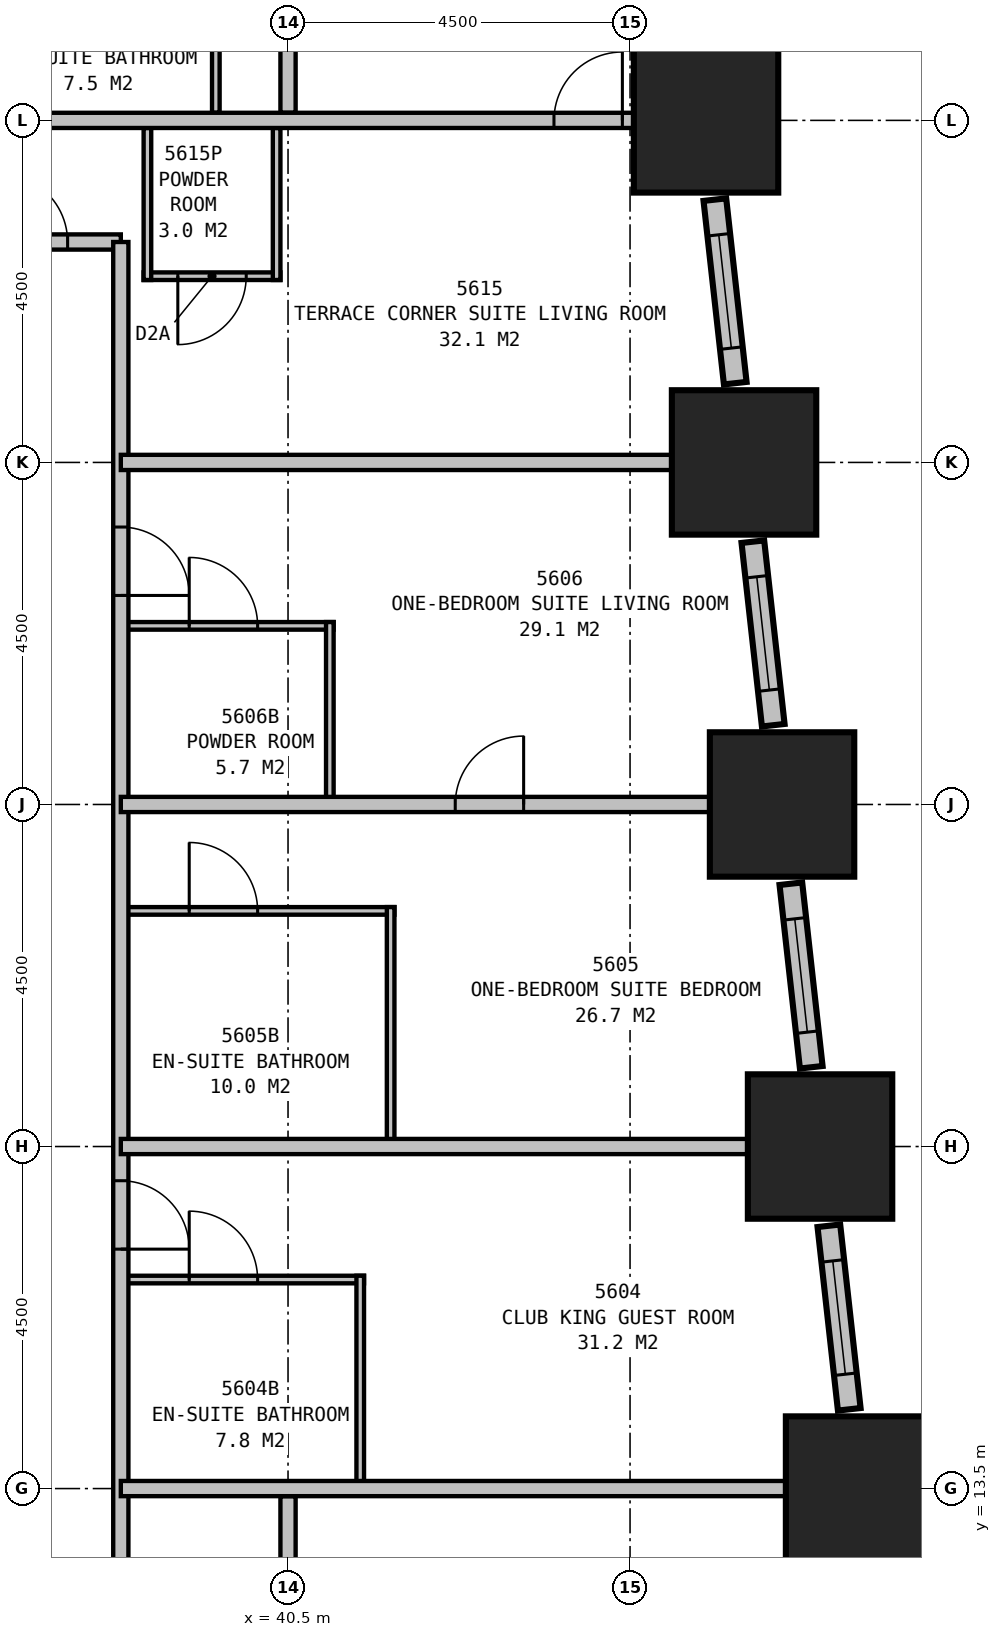
"""IFC4 building model, lengths in metres.
Left out: names, types, materials, properties, quantities, classifications, styles, units other than length and angle.
Written with IfcOpenShell. Run it as: python <this file> out.ifc"""

import sys

from ifc_helpers import new_model, si_unit, direction, frame, frame_2d, origin, origin_2d, place, context, subcontext, project, spatial, rectangle, extrude, element, fill, save


model = new_model("IFC4")
c1 = context("Model", 3, precision=1e-05, world=origin(), true_north=direction((0.0, 1.0)))
c2 = subcontext(c1, "Body", "Model", "MODEL_VIEW")
j1 = project(units=[si_unit("LENGTHUNIT", "METRE"), si_unit("PLANEANGLEUNIT", "RADIAN")], contexts=[c1])
p1 = place(None, origin())
s1 = spatial("IfcSite", under=j1, at=p1, CompositionType="ELEMENT")
p2 = place(p1, origin())
s2 = spatial("IfcBuilding", under=s1, at=p2, CompositionType="ELEMENT")
p3 = place(p2, frame((0.0, 0.0, 217.4)))
s3 = spatial("IfcBuildingStorey", under=s2, at=p3, CompositionType="ELEMENT", Elevation=217.4)
for number, where, z_axis, x_axis in (
    (1, (48.0, 13.5, 0.0), (0.0, 0.0, 1.0), (1.0, 0.0, 0.0)),
    (2, (47.5, 18.0, 0.0), (0.0, 0.0, 1.0), (1.0, 0.0, 0.0)),
    (3, (47.0, 22.5, 0.0), (0.0, 0.0, 1.0), (1.0, 0.0, 0.0)),
    (4, (46.5, 27.0, 0.0), (0.0, 0.0, 1.0), (1.0, 0.0, 0.0)),
    (5, (46.0, 31.5, 0.0), (0.0, 0.0, 1.0), (1.0, 0.0, 0.0)),
):
    element("IfcColumn", number, at=place(p3, frame(where, z_axis=z_axis, x_axis=x_axis)), inside=s3, PredefinedType="COLUMN", context=c2, shape_type="SweptSolid", body=[
        extrude(rectangle(XDim=1.9, YDim=1.9, at=origin_2d()), origin(), (0.0, 0.0, 1.0), 3.9),
    ])
p4 = place(p3, frame((47.884, 14.543, 0.0), z_axis=(0.0, 0.0, 1.0), x_axis=(-0.110343286306, 0.993893535127, 0.0)))
e6 = element("IfcWall", 6, at=p4, inside=s3, PredefinedType="STANDARD", context=c2, shape_type="SweptSolid", body=[
    extrude(rectangle(XDim=2.429, YDim=0.3, at=frame_2d((1.215, 0.0))), origin(), (0.0, 0.0, 1.0), 2.15),
])
p5 = place(p4, frame((0.465, 0.0, 0.5)))
e7 = element("IfcOpeningElement", 7, at=p5, cuts=e6, PredefinedType="OPENING", context=c2, shape_type="SweptSolid", body=[
    extrude(rectangle(XDim=1.5, YDim=1.5, at=frame_2d((0.75, 0.75))), frame((0.0, 0.16, 0.0), z_axis=(0.0, -1.0, 0.0), x_axis=(1.0, 0.0, 0.0)), (0.0, 0.0, 1.0), 0.32),
])
p6 = place(p3, frame((47.384, 19.043, 0.0), z_axis=(0.0, 0.0, 1.0), x_axis=(-0.110343286306, 0.993893535127, 0.0)))
e8 = element("IfcWall", 8, at=p6, inside=s3, PredefinedType="STANDARD", context=c2, shape_type="SweptSolid", body=[
    extrude(rectangle(XDim=2.429, YDim=0.3, at=frame_2d((1.215, 0.0))), origin(), (0.0, 0.0, 1.0), 2.15),
])
p7 = place(p6, frame((0.465, 0.0, 0.5)))
e9 = element("IfcOpeningElement", 9, at=p7, cuts=e8, PredefinedType="OPENING", context=c2, shape_type="SweptSolid", body=[
    extrude(rectangle(XDim=1.5, YDim=1.5, at=frame_2d((0.75, 0.75))), frame((0.0, 0.16, 0.0), z_axis=(0.0, -1.0, 0.0), x_axis=(1.0, 0.0, 0.0)), (0.0, 0.0, 1.0), 0.32),
])
p8 = place(p3, frame((46.884, 23.543, 0.0), z_axis=(0.0, 0.0, 1.0), x_axis=(-0.110343286306, 0.993893535127, 0.0)))
e10 = element("IfcWall", 10, at=p8, inside=s3, PredefinedType="STANDARD", context=c2, shape_type="SweptSolid", body=[
    extrude(rectangle(XDim=2.429, YDim=0.3, at=frame_2d((1.215, 0.0))), origin(), (0.0, 0.0, 1.0), 2.15),
])
p9 = place(p8, frame((0.465, 0.0, 0.5)))
e11 = element("IfcOpeningElement", 11, at=p9, cuts=e10, PredefinedType="OPENING", context=c2, shape_type="SweptSolid", body=[
    extrude(rectangle(XDim=1.5, YDim=1.5, at=frame_2d((0.75, 0.75))), frame((0.0, 0.16, 0.0), z_axis=(0.0, -1.0, 0.0), x_axis=(1.0, 0.0, 0.0)), (0.0, 0.0, 1.0), 0.32),
])
p10 = place(p3, frame((46.384, 28.043, 0.0), z_axis=(0.0, 0.0, 1.0), x_axis=(-0.110343286306, 0.993893535127, 0.0)))
e12 = element("IfcWall", 12, at=p10, inside=s3, PredefinedType="STANDARD", context=c2, shape_type="SweptSolid", body=[
    extrude(rectangle(XDim=2.429, YDim=0.3, at=frame_2d((1.215, 0.0))), origin(), (0.0, 0.0, 1.0), 2.15),
])
p11 = place(p10, frame((0.464, 0.0, 0.5)))
e13 = element("IfcOpeningElement", 13, at=p11, cuts=e12, PredefinedType="OPENING", context=c2, shape_type="SweptSolid", body=[
    extrude(rectangle(XDim=1.5, YDim=1.5, at=frame_2d((0.75, 0.75))), frame((0.0, 0.16, 0.0), z_axis=(0.0, -1.0, 0.0), x_axis=(1.0, 0.0, 0.0)), (0.0, 0.0, 1.0), 0.32),
])
p12 = place(p3, frame((12.473, 29.9, 0.0), z_axis=(0.0, 0.0, 1.0), x_axis=(1.0, 0.0, 0.0)))
e14 = element("IfcWall", 14, at=p12, inside=s3, PredefinedType="PARTITIONING", context=c2, shape_type="SweptSolid", body=[
    extrude(rectangle(XDim=25.827, YDim=0.2, at=frame_2d((12.914, 0.0))), origin(), (0.0, 0.0, 1.0), 3.65),
])
p13 = place(p12, frame((1.25, 0.0, 0.0)))
e15 = element("IfcOpeningElement", 15, at=p13, cuts=e14, PredefinedType="OPENING", context=c2, shape_type="SweptSolid", body=[
    extrude(rectangle(XDim=0.9, YDim=2.1, at=frame_2d((0.45, 1.05))), frame((0.0, 0.11, 0.0), z_axis=(0.0, -1.0, 0.0), x_axis=(1.0, 0.0, 0.0)), (0.0, 0.0, 1.0), 0.22),
])
p14 = place(p12, frame((8.677, 0.0, 0.0)))
e16 = element("IfcOpeningElement", 16, at=p14, cuts=e14, PredefinedType="OPENING", context=c2, shape_type="SweptSolid", body=[
    extrude(rectangle(XDim=0.9, YDim=2.1, at=frame_2d((0.45, 1.05))), frame((0.0, 0.11, 0.0), z_axis=(0.0, -1.0, 0.0), x_axis=(1.0, 0.0, 0.0)), (0.0, 0.0, 1.0), 0.22),
])
p15 = place(p12, frame((12.777, 0.0, 0.0)))
e17 = element("IfcOpeningElement", 17, at=p15, cuts=e14, PredefinedType="OPENING", context=c2, shape_type="SweptSolid", body=[
    extrude(rectangle(XDim=0.9, YDim=2.1, at=frame_2d((0.45, 1.05))), frame((0.0, 0.11, 0.0), z_axis=(0.0, -1.0, 0.0), x_axis=(1.0, 0.0, 0.0)), (0.0, 0.0, 1.0), 0.22),
])
p16 = place(p12, frame((22.177, 0.0, 0.0)))
e18 = element("IfcOpeningElement", 18, at=p16, cuts=e14, PredefinedType="OPENING", context=c2, shape_type="SweptSolid", body=[
    extrude(rectangle(XDim=0.9, YDim=2.1, at=frame_2d((0.45, 1.05))), frame((0.0, 0.11, 0.0), z_axis=(0.0, -1.0, 0.0), x_axis=(1.0, 0.0, 0.0)), (0.0, 0.0, 1.0), 0.22),
])
p17 = place(p12, frame((24.227, 0.0, 0.0)))
e19 = element("IfcOpeningElement", 19, at=p17, cuts=e14, PredefinedType="OPENING", context=c2, shape_type="SweptSolid", body=[
    extrude(rectangle(XDim=0.9, YDim=2.1, at=frame_2d((0.45, 1.05))), frame((0.0, 0.11, 0.0), z_axis=(0.0, -1.0, 0.0), x_axis=(1.0, 0.0, 0.0)), (0.0, 0.0, 1.0), 0.22),
])
p18 = place(p3, frame((38.3, 11.2, 0.0), z_axis=(0.0, 0.0, 1.0), x_axis=(0.0, 1.0, 0.0)))
e20 = element("IfcWall", 20, at=p18, inside=s3, PredefinedType="PARTITIONING", context=c2, shape_type="SweptSolid", body=[
    extrude(rectangle(XDim=18.7, YDim=0.2, at=frame_2d((9.35, 0.0))), origin(), (0.0, 0.0, 1.0), 3.65),
])
p19 = place(p18, frame((6.35, 0.0, 0.0), z_axis=(0.0, 0.0, 1.0), x_axis=(-1.0, 0.0, 0.0)))
e21 = element("IfcOpeningElement", 21, at=p19, cuts=e20, PredefinedType="OPENING", context=c2, shape_type="SweptSolid", body=[
    extrude(rectangle(XDim=0.9, YDim=2.1, at=frame_2d((0.45, 1.05))), frame((0.0, 0.11, 0.0), z_axis=(0.0, -1.0, 0.0), x_axis=(1.0, 0.0, 0.0)), (0.0, 0.0, 1.0), 0.22),
])
p20 = place(p18, frame((14.95, 0.0, 0.0), z_axis=(0.0, 0.0, 1.0), x_axis=(-1.0, 0.0, 0.0)))
e22 = element("IfcOpeningElement", 22, at=p20, cuts=e20, PredefinedType="OPENING", context=c2, shape_type="SweptSolid", body=[
    extrude(rectangle(XDim=0.9, YDim=2.1, at=frame_2d((0.45, 1.05))), frame((0.0, 0.11, 0.0), z_axis=(0.0, -1.0, 0.0), x_axis=(1.0, 0.0, 0.0)), (0.0, 0.0, 1.0), 0.22),
])
p21 = place(p3, frame((38.3, 18.0, 0.0), z_axis=(0.0, 0.0, 1.0), x_axis=(1.0, 0.0, 0.0)))
e23 = element("IfcWall", 23, at=p21, inside=s3, PredefinedType="PARTITIONING", context=c2, shape_type="SweptSolid", body=[
    extrude(rectangle(XDim=9.199, YDim=0.2, at=frame_2d((4.6, 0.0))), origin(), (0.0, 0.0, 1.0), 2.65),
])
p22 = place(p3, frame((38.3, 22.5, 0.0), z_axis=(0.0, 0.0, 1.0), x_axis=(1.0, 0.0, 0.0)))
e24 = element("IfcWall", 24, at=p22, inside=s3, PredefinedType="PARTITIONING", context=c2, shape_type="SweptSolid", body=[
    extrude(rectangle(XDim=8.699, YDim=0.2, at=frame_2d((4.35, 0.0))), origin(), (0.0, 0.0, 1.0), 2.65),
])
p23 = place(p22, frame((4.4, 0.0, 0.0)))
e25 = element("IfcOpeningElement", 25, at=p23, cuts=e24, PredefinedType="OPENING", context=c2, shape_type="SweptSolid", body=[
    extrude(rectangle(XDim=0.9, YDim=2.1, at=frame_2d((0.45, 1.05))), frame((0.0, 0.11, 0.0), z_axis=(0.0, -1.0, 0.0), x_axis=(1.0, 0.0, 0.0)), (0.0, 0.0, 1.0), 0.22),
])
p24 = place(p3, frame((41.45, 13.5, 0.0), z_axis=(0.0, 0.0, 1.0), x_axis=(0.0, 1.0, 0.0)))
e26 = element("IfcWall", 26, at=p24, inside=s3, PredefinedType="PLUMBINGWALL", context=c2, shape_type="SweptSolid", body=[
    extrude(rectangle(XDim=2.8, YDim=0.1, at=frame_2d((1.4, 0.0))), origin(), (0.0, 0.0, 1.0), 3.65),
])
p25 = place(p3, frame((38.3, 16.25, 0.0), z_axis=(0.0, 0.0, 1.0), x_axis=(1.0, 0.0, 0.0)))
e27 = element("IfcWall", 27, at=p25, inside=s3, PredefinedType="PLUMBINGWALL", context=c2, shape_type="SweptSolid", body=[
    extrude(rectangle(XDim=3.2, YDim=0.1, at=frame_2d((1.6, 0.0))), origin(), (0.0, 0.0, 1.0), 3.65),
])
p26 = place(p25, frame((0.9, 0.0, 0.0)))
e28 = element("IfcOpeningElement", 28, at=p26, cuts=e27, PredefinedType="OPENING", context=c2, shape_type="SweptSolid", body=[
    extrude(rectangle(XDim=0.9, YDim=2.1, at=frame_2d((0.45, 1.05))), frame((0.0, 0.06, 0.0), z_axis=(0.0, -1.0, 0.0), x_axis=(1.0, 0.0, 0.0)), (0.0, 0.0, 1.0), 0.12),
])
p27 = place(p3, frame((41.85, 18.0, 0.0), z_axis=(0.0, 0.0, 1.0), x_axis=(0.0, 1.0, 0.0)))
e29 = element("IfcWall", 29, at=p27, inside=s3, PredefinedType="PLUMBINGWALL", context=c2, shape_type="SweptSolid", body=[
    extrude(rectangle(XDim=3.15, YDim=0.1, at=frame_2d((1.575, 0.0))), origin(), (0.0, 0.0, 1.0), 3.65),
])
p28 = place(p3, frame((38.3, 21.1, 0.0), z_axis=(0.0, 0.0, 1.0), x_axis=(1.0, 0.0, 0.0)))
e30 = element("IfcWall", 30, at=p28, inside=s3, PredefinedType="PLUMBINGWALL", context=c2, shape_type="SweptSolid", body=[
    extrude(rectangle(XDim=3.6, YDim=0.1, at=frame_2d((1.8, 0.0))), origin(), (0.0, 0.0, 1.0), 3.65),
])
p29 = place(p28, frame((0.9, 0.0, 0.0)))
e31 = element("IfcOpeningElement", 31, at=p29, cuts=e30, PredefinedType="OPENING", context=c2, shape_type="SweptSolid", body=[
    extrude(rectangle(XDim=0.9, YDim=2.1, at=frame_2d((0.45, 1.05))), frame((0.0, 0.06, 0.0), z_axis=(0.0, -1.0, 0.0), x_axis=(1.0, 0.0, 0.0)), (0.0, 0.0, 1.0), 0.12),
])
p30 = place(p3, frame((41.05, 22.5, 0.0), z_axis=(0.0, 0.0, 1.0), x_axis=(0.0, 1.0, 0.0)))
e32 = element("IfcWall", 32, at=p30, inside=s3, PredefinedType="PLUMBINGWALL", context=c2, shape_type="SweptSolid", body=[
    extrude(rectangle(XDim=2.4, YDim=0.1, at=frame_2d((1.2, 0.0))), origin(), (0.0, 0.0, 1.0), 3.65),
])
p31 = place(p3, frame((38.3, 24.85, 0.0), z_axis=(0.0, 0.0, 1.0), x_axis=(1.0, 0.0, 0.0)))
e33 = element("IfcWall", 33, at=p31, inside=s3, PredefinedType="PLUMBINGWALL", context=c2, shape_type="SweptSolid", body=[
    extrude(rectangle(XDim=2.8, YDim=0.1, at=frame_2d((1.4, 0.0))), origin(), (0.0, 0.0, 1.0), 3.65),
])
p32 = place(p31, frame((0.9, 0.0, 0.0)))
e34 = element("IfcOpeningElement", 34, at=p32, cuts=e33, PredefinedType="OPENING", context=c2, shape_type="SweptSolid", body=[
    extrude(rectangle(XDim=0.9, YDim=2.1, at=frame_2d((0.45, 1.05))), frame((0.0, 0.06, 0.0), z_axis=(0.0, -1.0, 0.0), x_axis=(1.0, 0.0, 0.0)), (0.0, 0.0, 1.0), 0.12),
])
p33 = place(p3, frame((38.3, 13.5, 0.0), z_axis=(0.0, 0.0, 1.0), x_axis=(1.0, 0.0, 0.0)))
e35 = element("IfcWall", 35, at=p33, inside=s3, PredefinedType="PARTITIONING", context=c2, shape_type="SweptSolid", body=[
    extrude(rectangle(XDim=9.921, YDim=0.2, at=frame_2d((4.96, 0.0))), origin(), (0.0, 0.0, 1.0), 2.35),
])
p34 = place(p3, frame((40.5, 4.6, 0.0), z_axis=(0.0, 0.0, 1.0), x_axis=(0.0, 1.0, 0.0)))
e36 = element("IfcWall", 36, at=p34, inside=s3, PredefinedType="PARTITIONING", context=c2, shape_type="SweptSolid", body=[
    extrude(rectangle(XDim=8.8, YDim=0.2, at=frame_2d((4.4, 0.0))), origin(), (0.0, 0.0, 1.0), 2.65),
])
p35 = place(p34, frame((4.05, 0.0, 0.0)))
e37 = element("IfcOpeningElement", 37, at=p35, cuts=e36, PredefinedType="OPENING", context=c2, shape_type="SweptSolid", body=[
    extrude(rectangle(XDim=0.9, YDim=2.1, at=frame_2d((0.45, 1.05))), frame((0.0, 0.11, 0.0), z_axis=(0.0, -1.0, 0.0), x_axis=(1.0, 0.0, 0.0)), (0.0, 0.0, 1.0), 0.22),
])
p36 = place(p3, frame((38.3, 27.0, 0.0), z_axis=(0.0, 0.0, 1.0), x_axis=(1.0, 0.0, 0.0)))
e38 = element("IfcWall", 38, at=p36, inside=s3, PredefinedType="PARTITIONING", context=c2, shape_type="SweptSolid", body=[
    extrude(rectangle(XDim=7.977, YDim=0.2, at=frame_2d((3.988, 0.0))), origin(), (0.0, 0.0, 1.0), 2.35),
])
p37 = place(p3, frame((35.9, 31.5, 0.0), z_axis=(0.0, 0.0, 1.0), x_axis=(1.0, 0.0, 0.0)))
e39 = element("IfcWall", 39, at=p37, inside=s3, PredefinedType="PARTITIONING", context=c2, shape_type="SweptSolid", body=[
    extrude(rectangle(XDim=10.099, YDim=0.2, at=frame_2d((5.05, 0.0))), origin(), (0.0, 0.0, 1.0), 3.65),
])
p38 = place(p37, frame((8.099, 0.0, 0.0)))
e40 = element("IfcOpeningElement", 40, at=p38, cuts=e39, PredefinedType="OPENING", context=c2, shape_type="SweptSolid", body=[
    extrude(rectangle(XDim=0.9, YDim=2.1, at=frame_2d((0.45, 1.05))), frame((0.0, 0.11, 0.0), z_axis=(0.0, -1.0, 0.0), x_axis=(1.0, 0.0, 0.0)), (0.0, 0.0, 1.0), 0.22),
])
p39 = place(p3, frame((40.35, 31.4, 0.0), z_axis=(0.0, 0.0, 1.0), x_axis=(0.0, -1.0, 0.0)))
e41 = element("IfcWall", 41, at=p39, inside=s3, PredefinedType="PLUMBINGWALL", context=c2, shape_type="SweptSolid", body=[
    extrude(rectangle(XDim=2.0, YDim=0.1, at=frame_2d((1.0, 0.0))), origin(), (0.0, 0.0, 1.0), 2.65),
])
p40 = place(p3, frame((38.65, 31.4, 0.0), z_axis=(0.0, 0.0, 1.0), x_axis=(0.0, -1.0, 0.0)))
e42 = element("IfcWall", 42, at=p40, inside=s3, PredefinedType="PLUMBINGWALL", context=c2, shape_type="SweptSolid", body=[
    extrude(rectangle(XDim=2.0, YDim=0.1, at=frame_2d((1.0, 0.0))), origin(), (0.0, 0.0, 1.0), 3.65),
])
p41 = place(p3, frame((38.6, 29.45, 0.0), z_axis=(0.0, 0.0, 1.0), x_axis=(1.0, 0.0, 0.0)))
e43 = element("IfcWall", 43, at=p41, inside=s3, PredefinedType="PLUMBINGWALL", context=c2, shape_type="SweptSolid", body=[
    extrude(rectangle(XDim=1.8, YDim=0.1, at=frame_2d((0.9, 0.0))), origin(), (0.0, 0.0, 1.0), 3.65),
])
p42 = place(p41, frame((1.35, 0.0, 0.0), z_axis=(0.0, 0.0, 1.0), x_axis=(-1.0, 0.0, 0.0)))
e44 = element("IfcOpeningElement", 44, at=p42, cuts=e43, PredefinedType="OPENING", context=c2, shape_type="SweptSolid", body=[
    extrude(rectangle(XDim=0.9, YDim=2.1, at=frame_2d((0.45, 1.05))), frame((0.0, 0.06, 0.0), z_axis=(0.0, -1.0, 0.0), x_axis=(1.0, 0.0, 0.0)), (0.0, 0.0, 1.0), 0.12),
])
p43 = place(p3, frame((40.5, 31.6, 0.0), z_axis=(0.0, 0.0, 1.0), x_axis=(0.0, 1.0, 0.0)))
e45 = element("IfcWall", 45, at=p43, inside=s3, PredefinedType="PARTITIONING", context=c2, shape_type="SweptSolid", body=[
    extrude(rectangle(XDim=4.4, YDim=0.2, at=frame_2d((2.2, 0.0))), origin(), (0.0, 0.0, 1.0), 2.65),
])
p44 = place(p43, frame((2.4, 0.0, 0.0)))
e46 = element("IfcOpeningElement", 46, at=p44, cuts=e45, PredefinedType="OPENING", context=c2, shape_type="SweptSolid", body=[
    extrude(rectangle(XDim=0.9, YDim=2.1, at=frame_2d((0.45, 1.05))), frame((0.0, 0.11, 0.0), z_axis=(0.0, -1.0, 0.0), x_axis=(1.0, 0.0, 0.0)), (0.0, 0.0, 1.0), 0.22),
])
p45 = place(p3, frame((39.55, 31.6, 0.0), z_axis=(0.0, 0.0, 1.0), x_axis=(0.0, 1.0, 0.0)))
e47 = element("IfcWall", 47, at=p45, inside=s3, PredefinedType="PLUMBINGWALL", context=c2, shape_type="SweptSolid", body=[
    extrude(rectangle(XDim=2.3, YDim=0.1, at=frame_2d((1.15, 0.0))), origin(), (0.0, 0.0, 1.0), 3.65),
])
p46 = place(p5, origin())
e48 = element("IfcWindow", 48, at=p46, inside=s3, PartitioningType="SINGLE_PANEL", PredefinedType="WINDOW", context=c2, shape_type="SweptSolid", body=[
    extrude(rectangle(XDim=1.5, YDim=1.5, at=frame_2d((0.75, 0.75))), frame((0.0, 0.03, 0.0), z_axis=(0.0, -1.0, 0.0), x_axis=(1.0, 0.0, 0.0)), (0.0, 0.0, 1.0), 0.06),
])
fill(e7, e48)
p47 = place(p7, origin())
e49 = element("IfcWindow", 49, at=p47, inside=s3, PartitioningType="SINGLE_PANEL", PredefinedType="WINDOW", context=c2, shape_type="SweptSolid", body=[
    extrude(rectangle(XDim=1.5, YDim=1.5, at=frame_2d((0.75, 0.75))), frame((0.0, 0.03, 0.0), z_axis=(0.0, -1.0, 0.0), x_axis=(1.0, 0.0, 0.0)), (0.0, 0.0, 1.0), 0.06),
])
fill(e9, e49)
p48 = place(p9, origin())
e50 = element("IfcWindow", 50, at=p48, inside=s3, PartitioningType="SINGLE_PANEL", PredefinedType="WINDOW", context=c2, shape_type="SweptSolid", body=[
    extrude(rectangle(XDim=1.5, YDim=1.5, at=frame_2d((0.75, 0.75))), frame((0.0, 0.03, 0.0), z_axis=(0.0, -1.0, 0.0), x_axis=(1.0, 0.0, 0.0)), (0.0, 0.0, 1.0), 0.06),
])
fill(e11, e50)
p49 = place(p11, origin())
e51 = element("IfcWindow", 51, at=p49, inside=s3, PartitioningType="SINGLE_PANEL", PredefinedType="WINDOW", context=c2, shape_type="SweptSolid", body=[
    extrude(rectangle(XDim=1.5, YDim=1.5, at=frame_2d((0.75, 0.75))), frame((0.0, 0.03, 0.0), z_axis=(0.0, -1.0, 0.0), x_axis=(1.0, 0.0, 0.0)), (0.0, 0.0, 1.0), 0.06),
])
fill(e13, e51)
p50 = place(p17, origin())
e52 = element("IfcDoor", 52, at=p50, inside=s3, OperationType="SINGLE_SWING_LEFT", PredefinedType="DOOR", context=c2, shape_type="SweptSolid", body=[
    extrude(rectangle(XDim=0.9, YDim=2.1, at=frame_2d((0.45, 1.05))), frame((0.0, 0.025, 0.0), z_axis=(0.0, -1.0, 0.0), x_axis=(1.0, 0.0, 0.0)), (0.0, 0.0, 1.0), 0.05),
])
fill(e19, e52)
p51 = place(p19, origin())
e53 = element("IfcDoor", 53, at=p51, inside=s3, OperationType="SINGLE_SWING_RIGHT", PredefinedType="DOOR", context=c2, shape_type="SweptSolid", body=[
    extrude(rectangle(XDim=0.9, YDim=2.1, at=frame_2d((0.45, 1.05))), frame((0.0, 0.025, 0.0), z_axis=(0.0, -1.0, 0.0), x_axis=(1.0, 0.0, 0.0)), (0.0, 0.0, 1.0), 0.05),
])
fill(e21, e53)
p52 = place(p20, origin())
e54 = element("IfcDoor", 54, at=p52, inside=s3, OperationType="SINGLE_SWING_RIGHT", PredefinedType="DOOR", context=c2, shape_type="SweptSolid", body=[
    extrude(rectangle(XDim=0.9, YDim=2.1, at=frame_2d((0.45, 1.05))), frame((0.0, 0.025, 0.0), z_axis=(0.0, -1.0, 0.0), x_axis=(1.0, 0.0, 0.0)), (0.0, 0.0, 1.0), 0.05),
])
fill(e22, e54)
p53 = place(p23, origin())
e55 = element("IfcDoor", 55, at=p53, inside=s3, OperationType="SINGLE_SWING_RIGHT", PredefinedType="DOOR", context=c2, shape_type="SweptSolid", body=[
    extrude(rectangle(XDim=0.9, YDim=2.1, at=frame_2d((0.45, 1.05))), frame((0.0, 0.025, 0.0), z_axis=(0.0, -1.0, 0.0), x_axis=(1.0, 0.0, 0.0)), (0.0, 0.0, 1.0), 0.05),
])
fill(e25, e55)
p54 = place(p26, origin())
e56 = element("IfcDoor", 56, at=p54, inside=s3, OperationType="SINGLE_SWING_LEFT", PredefinedType="DOOR", context=c2, shape_type="SweptSolid", body=[
    extrude(rectangle(XDim=0.9, YDim=2.1, at=frame_2d((0.45, 1.05))), frame((0.0, 0.025, 0.0), z_axis=(0.0, -1.0, 0.0), x_axis=(1.0, 0.0, 0.0)), (0.0, 0.0, 1.0), 0.05),
])
fill(e28, e56)
p55 = place(p29, origin())
e57 = element("IfcDoor", 57, at=p55, inside=s3, OperationType="SINGLE_SWING_LEFT", PredefinedType="DOOR", context=c2, shape_type="SweptSolid", body=[
    extrude(rectangle(XDim=0.9, YDim=2.1, at=frame_2d((0.45, 1.05))), frame((0.0, 0.025, 0.0), z_axis=(0.0, -1.0, 0.0), x_axis=(1.0, 0.0, 0.0)), (0.0, 0.0, 1.0), 0.05),
])
fill(e31, e57)
p56 = place(p32, origin())
e58 = element("IfcDoor", 58, at=p56, inside=s3, OperationType="SINGLE_SWING_LEFT", PredefinedType="DOOR", context=c2, shape_type="SweptSolid", body=[
    extrude(rectangle(XDim=0.9, YDim=2.1, at=frame_2d((0.45, 1.05))), frame((0.0, 0.025, 0.0), z_axis=(0.0, -1.0, 0.0), x_axis=(1.0, 0.0, 0.0)), (0.0, 0.0, 1.0), 0.05),
])
fill(e34, e58)
p57 = place(p38, origin())
e59 = element("IfcDoor", 59, at=p57, inside=s3, OperationType="SINGLE_SWING_RIGHT", PredefinedType="DOOR", context=c2, shape_type="SweptSolid", body=[
    extrude(rectangle(XDim=0.9, YDim=2.1, at=frame_2d((0.45, 1.05))), frame((0.0, 0.025, 0.0), z_axis=(0.0, -1.0, 0.0), x_axis=(1.0, 0.0, 0.0)), (0.0, 0.0, 1.0), 0.05),
])
fill(e40, e59)
p58 = place(p42, origin())
e60 = element("IfcDoor", 60, at=p58, inside=s3, OperationType="SINGLE_SWING_RIGHT", PredefinedType="DOOR", context=c2, shape_type="SweptSolid", body=[
    extrude(rectangle(XDim=0.9, YDim=2.1, at=frame_2d((0.45, 1.05))), frame((0.0, 0.025, 0.0), z_axis=(0.0, -1.0, 0.0), x_axis=(1.0, 0.0, 0.0)), (0.0, 0.0, 1.0), 0.05),
])
fill(e44, e60)
save(model, sys.argv[1])
